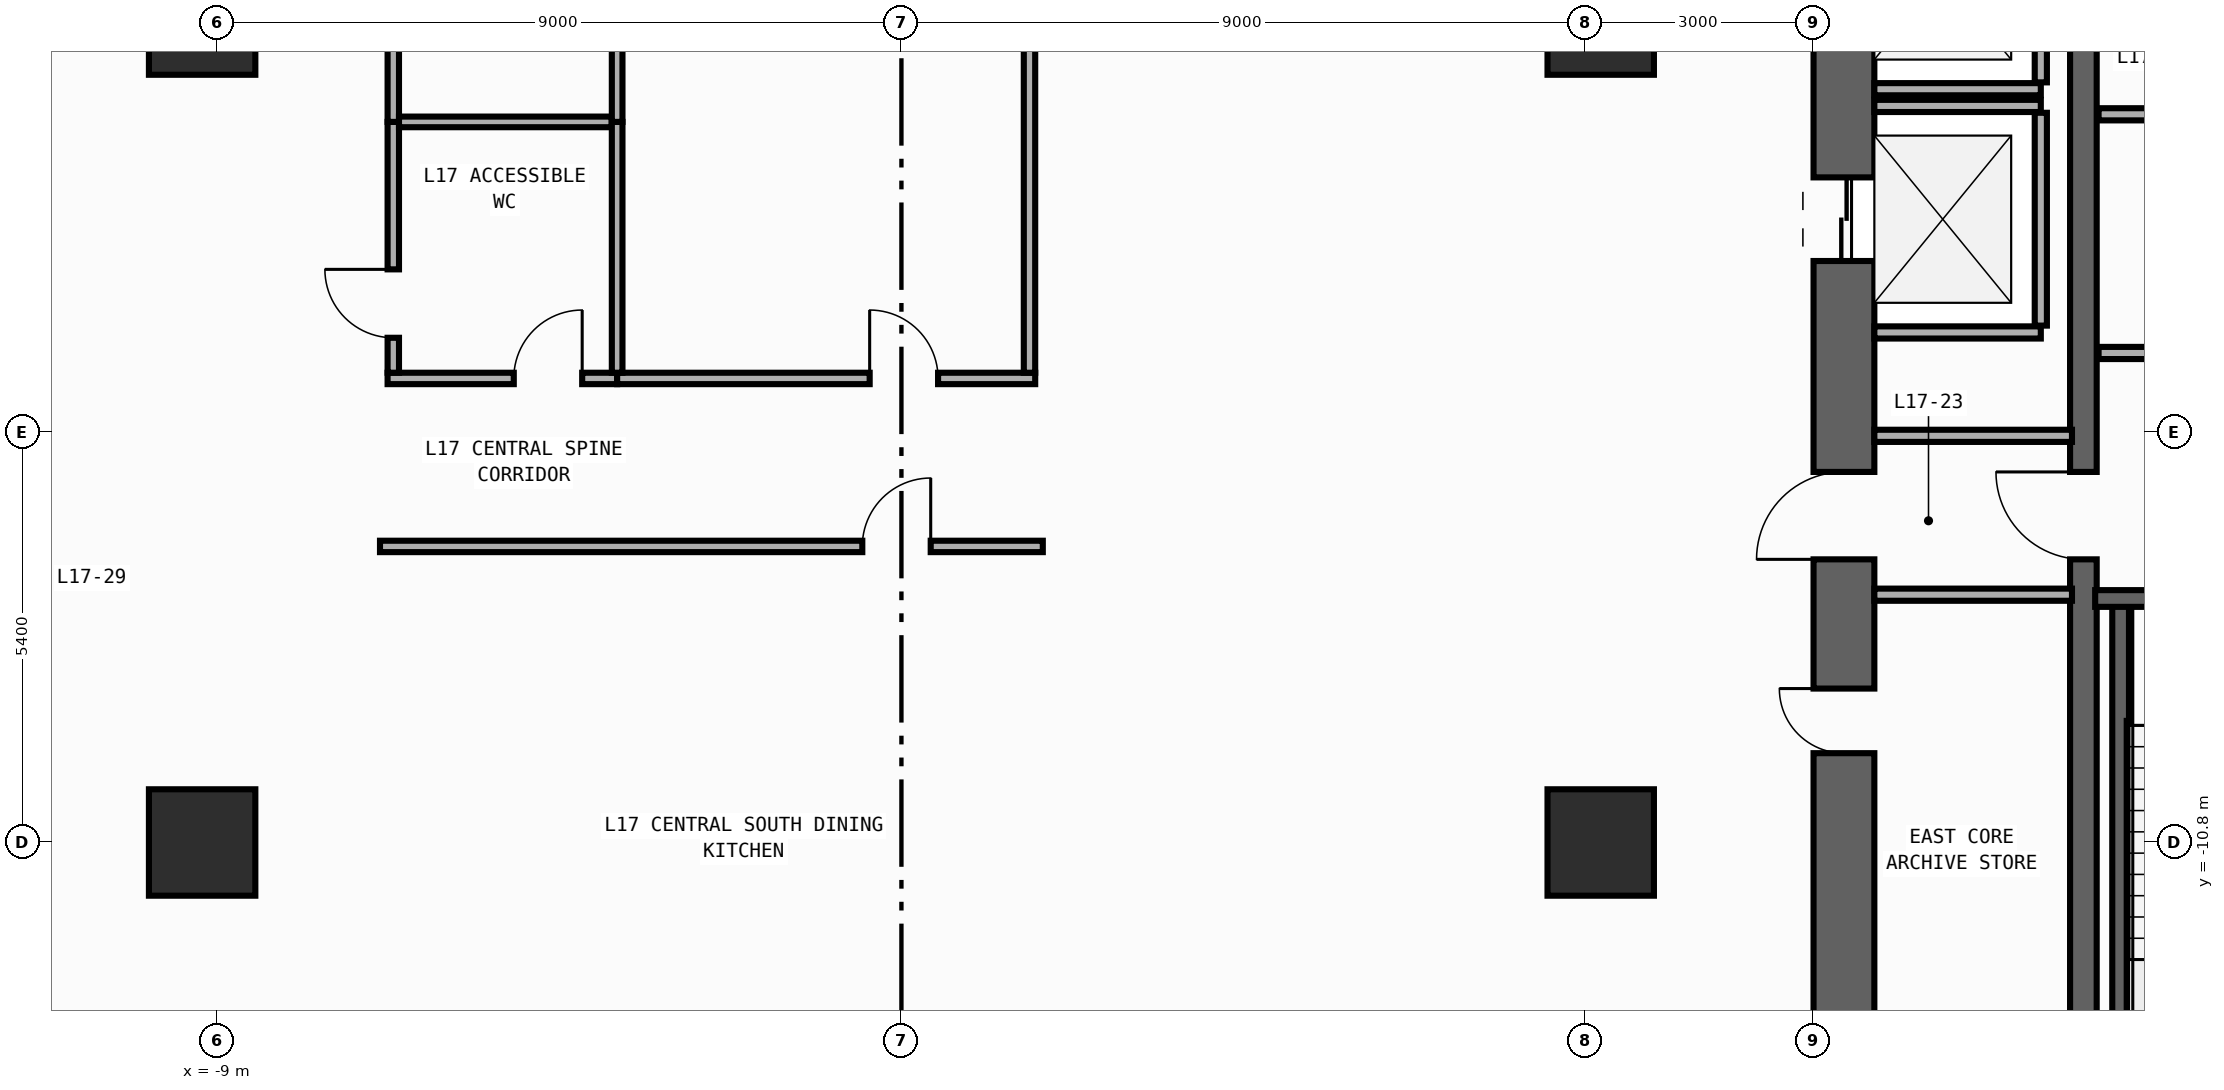
"""IFC4 building model, lengths in metres.
Left out: names, types, materials, properties, quantities, classifications, styles, units other than length and angle.
Written with IfcOpenShell. Run it as: python <this file> out.ifc"""

import sys

from ifc_helpers import new_model, si_unit, direction, frame, frame_2d, origin, origin_2d, place, context, subcontext, project, spatial, rectangle, extrude, element, fill, save


model = new_model("IFC4")
c1 = context("Model", 3, precision=1e-05, world=origin(), true_north=direction((0.0, 1.0)))
c2 = subcontext(c1, "Body", "Model", "MODEL_VIEW")
j1 = project(units=[si_unit("LENGTHUNIT", "METRE"), si_unit("PLANEANGLEUNIT", "RADIAN")], contexts=[c1])
p1 = place(None, origin())
s1 = spatial("IfcSite", under=j1, at=p1, CompositionType="ELEMENT")
p2 = place(p1, origin())
s2 = spatial("IfcBuilding", under=s1, at=p2, CompositionType="ELEMENT")
p3 = place(p2, frame((0.0, 0.0, 72.2)))
s3 = spatial("IfcBuildingStorey", under=s2, at=p3, CompositionType="ELEMENT", Elevation=72.2)
p4 = place(p3, frame((12.4, -19.8, 0.0), z_axis=(0.0, 0.0, 1.0), x_axis=(0.0, 1.0, 0.0)))
e1 = element("IfcWall", 1, at=p4, inside=s3, PredefinedType="SHEAR", context=c2, shape_type="SweptSolid", body=[
    extrude(rectangle(XDim=27.0, YDim=0.8, at=frame_2d((13.5, 0.0))), origin(), (0.0, 0.0, 1.0), 3.94),
])
p5 = place(p4, frame((23.05, 0.0, 0.0)))
e2 = element("IfcOpeningElement", 2, at=p5, cuts=e1, PredefinedType="OPENING", context=c2, shape_type="SweptSolid", body=[
    extrude(rectangle(XDim=1.1, YDim=2.2, at=frame_2d((0.55, 1.1))), frame((0.0, 0.41, 0.0), z_axis=(0.0, -1.0, 0.0), x_axis=(1.0, 0.0, 0.0)), (0.0, 0.0, 1.0), 0.82),
])
p6 = place(p4, frame((19.85, 0.0, 0.0)))
e3 = element("IfcOpeningElement", 3, at=p6, cuts=e1, PredefinedType="OPENING", context=c2, shape_type="SweptSolid", body=[
    extrude(rectangle(XDim=1.1, YDim=2.2, at=frame_2d((0.55, 1.1))), frame((0.0, 0.41, 0.0), z_axis=(0.0, -1.0, 0.0), x_axis=(1.0, 0.0, 0.0)), (0.0, 0.0, 1.0), 0.82),
])
p7 = place(p4, frame((16.65, 0.0, 0.0)))
e4 = element("IfcOpeningElement", 4, at=p7, cuts=e1, PredefinedType="OPENING", context=c2, shape_type="SweptSolid", body=[
    extrude(rectangle(XDim=1.1, YDim=2.2, at=frame_2d((0.55, 1.1))), frame((0.0, 0.41, 0.0), z_axis=(0.0, -1.0, 0.0), x_axis=(1.0, 0.0, 0.0)), (0.0, 0.0, 1.0), 0.82),
])
p8 = place(p4, frame((10.175, 0.0, 0.0)))
e5 = element("IfcOpeningElement", 5, at=p8, cuts=e1, PredefinedType="OPENING", context=c2, shape_type="SweptSolid", body=[
    extrude(rectangle(XDim=0.85, YDim=2.1, at=frame_2d((0.425, 1.05))), frame((0.0, 0.41, 0.0), z_axis=(0.0, -1.0, 0.0), x_axis=(1.0, 0.0, 0.0)), (0.0, 0.0, 1.0), 0.82),
])
p9 = place(p4, frame((12.725, 0.0, 0.0)))
e6 = element("IfcOpeningElement", 6, at=p9, cuts=e1, PredefinedType="OPENING", context=c2, shape_type="SweptSolid", body=[
    extrude(rectangle(XDim=1.15, YDim=2.2, at=frame_2d((0.575, 1.1))), frame((0.0, 0.41, 0.0), z_axis=(0.0, -1.0, 0.0), x_axis=(1.0, 0.0, 0.0)), (0.0, 0.0, 1.0), 0.82),
])
p10 = place(p4, frame((25.125, 0.0, 0.0)))
e7 = element("IfcOpeningElement", 7, at=p10, cuts=e1, PredefinedType="OPENING", context=c2, shape_type="SweptSolid", body=[
    extrude(rectangle(XDim=0.85, YDim=2.1, at=frame_2d((0.425, 1.05))), frame((0.0, 0.41, 0.0), z_axis=(0.0, -1.0, 0.0), x_axis=(1.0, 0.0, 0.0)), (0.0, 0.0, 1.0), 0.82),
])
p11 = place(p3, frame((15.55, -19.0, 0.0), z_axis=(0.0, 0.0, 1.0), x_axis=(0.0, 1.0, 0.0)))
e8 = element("IfcWall", 8, at=p11, inside=s3, PredefinedType="SHEAR", context=c2, shape_type="SweptSolid", body=[
    extrude(rectangle(XDim=25.4, YDim=0.35, at=frame_2d((12.7, 0.0))), origin(), (0.0, 0.0, 1.0), 3.94),
])
p12 = place(p11, frame((11.925, 0.0, 0.0)))
e9 = element("IfcOpeningElement", 9, at=p12, cuts=e8, PredefinedType="OPENING", context=c2, shape_type="SweptSolid", body=[
    extrude(rectangle(XDim=1.15, YDim=2.2, at=frame_2d((0.575, 1.1))), frame((0.0, 0.185, 0.0), z_axis=(0.0, -1.0, 0.0), x_axis=(1.0, 0.0, 0.0)), (0.0, 0.0, 1.0), 0.37),
])
p13 = place(p11, frame((24.325, 0.0, 0.0)))
e10 = element("IfcOpeningElement", 10, at=p13, cuts=e8, PredefinedType="OPENING", context=c2, shape_type="SweptSolid", body=[
    extrude(rectangle(XDim=0.85, YDim=2.1, at=frame_2d((0.425, 1.05))), frame((0.0, 0.185, 0.0), z_axis=(0.0, -1.0, 0.0), x_axis=(1.0, 0.0, 0.0)), (0.0, 0.0, 1.0), 0.37),
])
p14 = place(p3, frame((16.04, -18.89, 0.0), z_axis=(0.0, 0.0, 1.0), x_axis=(0.0, 1.0, 0.0)))
e11 = element("IfcWall", 11, at=p14, inside=s3, PredefinedType="SHEAR", context=c2, shape_type="SweptSolid", body=[
    extrude(rectangle(XDim=11.3, YDim=0.22, at=frame_2d((5.65, 0.0))), origin(), (0.0, 0.0, 1.0), 3.94),
])
p15 = place(p3, frame((19.62, -7.59, 0.0), z_axis=(0.0, 0.0, 1.0), x_axis=(-1.0, 0.0, 0.0)))
e12 = element("IfcWall", 12, at=p15, inside=s3, PredefinedType="SHEAR", context=c2, shape_type="SweptSolid", body=[
    extrude(rectangle(XDim=3.915, YDim=0.22, at=frame_2d((1.958, 0.0))), origin(), (0.0, 0.0, 1.0), 3.94),
])
p16 = place(p15, frame((1.08, 0.0, 0.0)))
e13 = element("IfcOpeningElement", 13, at=p16, cuts=e12, PredefinedType="OPENING", context=c2, shape_type="SweptSolid", body=[
    extrude(rectangle(XDim=1.1, YDim=2.2, at=frame_2d((0.55, 1.1))), frame((0.0, 0.12, 0.0), z_axis=(0.0, -1.0, 0.0), x_axis=(1.0, 0.0, 0.0)), (0.0, 0.0, 1.0), 0.24),
])
for number, where, z_axis, x_axis in (
    (14, (-9.2, -10.8, 0.0), (0.0, 0.0, 1.0), (1.0, 0.0, 0.0)),
    (15, (-9.2, 0.0, 0.0), (0.0, 0.0, 1.0), (1.0, 0.0, 0.0)),
    (16, (9.2, -10.8, 0.0), (0.0, 0.0, 1.0), (1.0, 0.0, 0.0)),
    (17, (9.2, 0.0, 0.0), (0.0, 0.0, 1.0), (1.0, 0.0, 0.0)),
):
    element("IfcColumn", number, at=place(p3, frame(where, z_axis=z_axis, x_axis=x_axis)), inside=s3, PredefinedType="COLUMN", context=c2, shape_type="SweptSolid", body=[
        extrude(rectangle(XDim=1.4, YDim=1.4, at=origin_2d()), origin(), (0.0, 0.0, 1.0), 4.2),
    ])
p17 = place(p3, frame((12.8, -0.89, 0.0), z_axis=(0.0, 0.0, 1.0), x_axis=(1.0, 0.0, 0.0)))
e18 = element("IfcWall", 18, at=p17, inside=s3, PredefinedType="STANDARD", context=c2, shape_type="SweptSolid", body=[
    extrude(rectangle(XDim=2.19, YDim=0.16, at=frame_2d((1.095, 0.0))), origin(), (0.0, 0.0, 1.0), 3.94),
])
p18 = place(p3, frame((14.99, -0.8, 0.0), z_axis=(0.0, 0.0, 1.0), x_axis=(0.0, 1.0, 0.0)))
e19 = element("IfcWall", 19, at=p18, inside=s3, PredefinedType="STANDARD", context=c2, shape_type="SweptSolid", body=[
    extrude(rectangle(XDim=2.8, YDim=0.16, at=frame_2d((1.4, 0.0))), origin(), (0.0, 0.0, 1.0), 3.94),
])
for number, where, z_axis, x_axis in (
    (20, (12.8, -4.09, 0.0), (0.0, 0.0, 1.0), (1.0, 0.0, 0.0)),
    (21, (12.8, -1.11, 0.0), (0.0, 0.0, 1.0), (1.0, 0.0, 0.0)),
):
    element("IfcWall", number, at=place(p3, frame(where, z_axis=z_axis, x_axis=x_axis)), inside=s3, PredefinedType="STANDARD", context=c2, shape_type="SweptSolid", body=[
        extrude(rectangle(XDim=2.19, YDim=0.16, at=frame_2d((1.095, 0.0))), origin(), (0.0, 0.0, 1.0), 3.94),
    ])
p19 = place(p3, frame((14.99, -4.0, 0.0), z_axis=(0.0, 0.0, 1.0), x_axis=(0.0, 1.0, 0.0)))
e22 = element("IfcWall", 22, at=p19, inside=s3, PredefinedType="STANDARD", context=c2, shape_type="SweptSolid", body=[
    extrude(rectangle(XDim=2.8, YDim=0.16, at=frame_2d((1.4, 0.0))), origin(), (0.0, 0.0, 1.0), 3.94),
])
p20 = place(p3, frame((15.75, -4.36, 0.0), z_axis=(0.0, 0.0, 1.0), x_axis=(1.0, 0.0, 0.0)))
e23 = element("IfcWall", 23, at=p20, inside=s3, PredefinedType="STANDARD", context=c2, shape_type="SweptSolid", body=[
    extrude(rectangle(XDim=3.8, YDim=0.16, at=frame_2d((1.9, 0.0))), origin(), (0.0, 0.0, 1.0), 3.94),
])
p21 = place(p20, frame((1.47, 0.0, 0.0)))
e24 = element("IfcOpeningElement", 24, at=p21, cuts=e23, PredefinedType="OPENING", context=c2, shape_type="SweptSolid", body=[
    extrude(rectangle(XDim=1.15, YDim=2.2, at=frame_2d((0.575, 1.1))), frame((0.0, 0.09, 0.0), z_axis=(0.0, -1.0, 0.0), x_axis=(1.0, 0.0, 0.0)), (0.0, 0.0, 1.0), 0.18),
])
p22 = place(p3, frame((15.75, -1.22, 0.0), z_axis=(0.0, 0.0, 1.0), x_axis=(1.0, 0.0, 0.0)))
e25 = element("IfcWall", 25, at=p22, inside=s3, PredefinedType="STANDARD", context=c2, shape_type="SweptSolid", body=[
    extrude(rectangle(XDim=3.8, YDim=0.16, at=frame_2d((1.9, 0.0))), origin(), (0.0, 0.0, 1.0), 3.94),
])
for number, where, z_axis, x_axis in (
    (26, (12.8, -5.45, 0.0), (0.0, 0.0, 1.0), (1.0, 0.0, 0.0)),
    (27, (12.8, -7.54, 0.0), (0.0, 0.0, 1.0), (1.0, 0.0, 0.0)),
):
    element("IfcWall", number, at=place(p3, frame(where, z_axis=z_axis, x_axis=x_axis)), inside=s3, PredefinedType="STANDARD", context=c2, shape_type="SweptSolid", body=[
        extrude(rectangle(XDim=2.6, YDim=0.16, at=frame_2d((1.3, 0.0))), origin(), (0.0, 0.0, 1.0), 3.94),
    ])
p23 = place(p3, frame((-6.76, -4.695, 0.0), z_axis=(0.0, 0.0, 1.0), x_axis=(1.0, 0.0, 0.0)))
e28 = element("IfcWall", 28, at=p23, inside=s3, PredefinedType="PARTITIONING", context=c2, shape_type="SweptSolid", body=[
    extrude(rectangle(XDim=3.02, YDim=0.15, at=frame_2d((1.51, 0.0))), origin(), (0.0, 0.0, 1.0), 3.94),
])
p24 = place(p23, frame((1.66, 0.0, 0.0)))
e29 = element("IfcOpeningElement", 29, at=p24, cuts=e28, PredefinedType="OPENING", context=c2, shape_type="SweptSolid", body=[
    extrude(rectangle(XDim=0.9, YDim=2.15, at=frame_2d((0.45, 1.075))), frame((0.0, 0.085, 0.0), z_axis=(0.0, -1.0, 0.0), x_axis=(1.0, 0.0, 0.0)), (0.0, 0.0, 1.0), 0.17),
])
p25 = place(p3, frame((-3.74, -4.695, 0.0), z_axis=(0.0, 0.0, 1.0), x_axis=(1.0, 0.0, 0.0)))
e30 = element("IfcWall", 30, at=p25, inside=s3, PredefinedType="PARTITIONING", context=c2, shape_type="SweptSolid", body=[
    extrude(rectangle(XDim=5.5, YDim=0.15, at=frame_2d((2.75, 0.0))), origin(), (0.0, 0.0, 1.0), 3.94),
])
p26 = place(p25, frame((3.322, 0.0, 0.0)))
e31 = element("IfcOpeningElement", 31, at=p26, cuts=e30, PredefinedType="OPENING", context=c2, shape_type="SweptSolid", body=[
    extrude(rectangle(XDim=0.9, YDim=2.15, at=frame_2d((0.45, 1.075))), frame((0.0, 0.085, 0.0), z_axis=(0.0, -1.0, 0.0), x_axis=(1.0, 0.0, 0.0)), (0.0, 0.0, 1.0), 0.17),
])
p27 = place(p3, frame((-6.86, -6.905, 0.0), z_axis=(0.0, 0.0, 1.0), x_axis=(1.0, 0.0, 0.0)))
e32 = element("IfcWall", 32, at=p27, inside=s3, PredefinedType="PARTITIONING", context=c2, shape_type="SweptSolid", body=[
    extrude(rectangle(XDim=8.72, YDim=0.15, at=frame_2d((4.36, 0.0))), origin(), (0.0, 0.0, 1.0), 3.94),
])
p28 = place(p27, frame((6.345, 0.0, 0.0)))
e33 = element("IfcOpeningElement", 33, at=p28, cuts=e32, PredefinedType="OPENING", context=c2, shape_type="SweptSolid", body=[
    extrude(rectangle(XDim=0.9, YDim=2.15, at=frame_2d((0.45, 1.075))), frame((0.0, 0.085, 0.0), z_axis=(0.0, -1.0, 0.0), x_axis=(1.0, 0.0, 0.0)), (0.0, 0.0, 1.0), 0.17),
])
p29 = place(p3, frame((-6.685, -4.62, 0.0), z_axis=(0.0, 0.0, 1.0), x_axis=(0.0, 1.0, 0.0)))
e34 = element("IfcWall", 34, at=p29, inside=s3, PredefinedType="PARTITIONING", context=c2, shape_type="SweptSolid", body=[
    extrude(rectangle(XDim=3.3, YDim=0.15, at=frame_2d((1.65, 0.0))), origin(), (0.0, 0.0, 1.0), 3.94),
])
p30 = place(p29, frame((0.46, 0.0, 0.0)))
e35 = element("IfcOpeningElement", 35, at=p30, cuts=e34, PredefinedType="OPENING", context=c2, shape_type="SweptSolid", body=[
    extrude(rectangle(XDim=0.9, YDim=2.15, at=frame_2d((0.45, 1.075))), frame((0.0, 0.085, 0.0), z_axis=(0.0, -1.0, 0.0), x_axis=(1.0, 0.0, 0.0)), (0.0, 0.0, 1.0), 0.17),
])
p31 = place(p3, frame((-6.685, -1.32, 0.0), z_axis=(0.0, 0.0, 1.0), x_axis=(0.0, 1.0, 0.0)))
e36 = element("IfcWall", 36, at=p31, inside=s3, PredefinedType="PARTITIONING", context=c2, shape_type="SweptSolid", body=[
    extrude(rectangle(XDim=6.96, YDim=0.15, at=frame_2d((3.48, 0.0))), origin(), (0.0, 0.0, 1.0), 3.94),
])
p32 = place(p31, frame((5.6, 0.0, 0.0)))
e37 = element("IfcOpeningElement", 37, at=p32, cuts=e36, PredefinedType="OPENING", context=c2, shape_type="SweptSolid", body=[
    extrude(rectangle(XDim=0.9, YDim=2.15, at=frame_2d((0.45, 1.075))), frame((0.0, 0.085, 0.0), z_axis=(0.0, -1.0, 0.0), x_axis=(1.0, 0.0, 0.0)), (0.0, 0.0, 1.0), 0.17),
])
p33 = place(p3, frame((1.685, -4.62, 0.0), z_axis=(0.0, 0.0, 1.0), x_axis=(0.0, 1.0, 0.0)))
e38 = element("IfcWall", 38, at=p33, inside=s3, PredefinedType="PARTITIONING", context=c2, shape_type="SweptSolid", body=[
    extrude(rectangle(XDim=20.005, YDim=0.15, at=frame_2d((10.002, 0.0))), origin(), (0.0, 0.0, 1.0), 3.94),
])
p34 = place(p33, frame((9.552, 0.0, 0.0)))
e39 = element("IfcOpeningElement", 39, at=p34, cuts=e38, PredefinedType="OPENING", context=c2, shape_type="SweptSolid", body=[
    extrude(rectangle(XDim=0.9, YDim=2.15, at=frame_2d((0.45, 1.075))), frame((0.0, 0.085, 0.0), z_axis=(0.0, -1.0, 0.0), x_axis=(1.0, 0.0, 0.0)), (0.0, 0.0, 1.0), 0.17),
])
p35 = place(p3, frame((-6.61, -1.32, 0.0), z_axis=(0.0, 0.0, 1.0), x_axis=(1.0, 0.0, 0.0)))
e40 = element("IfcWall", 40, at=p35, inside=s3, PredefinedType="PARTITIONING", context=c2, shape_type="SweptSolid", body=[
    extrude(rectangle(XDim=2.8, YDim=0.14, at=frame_2d((1.4, 0.0))), origin(), (0.0, 0.0, 1.0), 3.94),
])
p36 = place(p3, frame((-3.74, -4.62, 0.0), z_axis=(0.0, 0.0, 1.0), x_axis=(0.0, 1.0, 0.0)))
e41 = element("IfcWall", 41, at=p36, inside=s3, PredefinedType="PARTITIONING", context=c2, shape_type="SweptSolid", body=[
    extrude(rectangle(XDim=3.3, YDim=0.14, at=frame_2d((1.65, 0.0))), origin(), (0.0, 0.0, 1.0), 3.94),
])
p37 = place(p3, frame((-3.74, -1.32, 0.0), z_axis=(0.0, 0.0, 1.0), x_axis=(0.0, 1.0, 0.0)))
e42 = element("IfcWall", 42, at=p37, inside=s3, PredefinedType="PARTITIONING", context=c2, shape_type="SweptSolid", body=[
    extrude(rectangle(XDim=6.96, YDim=0.14, at=frame_2d((3.48, 0.0))), origin(), (0.0, 0.0, 1.0), 3.94),
])
p38 = place(p7, origin())
e43 = element("IfcDoor", 43, at=p38, inside=s3, OperationType="DOUBLE_DOOR_SLIDING", PredefinedType="DOOR", context=c2, shape_type="SweptSolid", body=[
    extrude(rectangle(XDim=1.1, YDim=2.2, at=frame_2d((0.55, 1.1))), frame((0.0, 0.025, 0.0), z_axis=(0.0, -1.0, 0.0), x_axis=(1.0, 0.0, 0.0)), (0.0, 0.0, 1.0), 0.05),
])
fill(e4, e43)
p39 = place(p8, origin())
e44 = element("IfcDoor", 44, at=p39, inside=s3, OperationType="SINGLE_SWING_RIGHT", PredefinedType="DOOR", context=c2, shape_type="SweptSolid", body=[
    extrude(rectangle(XDim=0.85, YDim=2.1, at=frame_2d((0.425, 1.05))), frame((0.0, 0.025, 0.0), z_axis=(0.0, -1.0, 0.0), x_axis=(1.0, 0.0, 0.0)), (0.0, 0.0, 1.0), 0.05),
])
fill(e5, e44)
p40 = place(p9, origin())
e45 = element("IfcDoor", 45, at=p40, inside=s3, OperationType="SINGLE_SWING_LEFT", PredefinedType="DOOR", context=c2, shape_type="SweptSolid", body=[
    extrude(rectangle(XDim=1.15, YDim=2.2, at=frame_2d((0.575, 1.1))), frame((0.0, 0.025, 0.0), z_axis=(0.0, -1.0, 0.0), x_axis=(1.0, 0.0, 0.0)), (0.0, 0.0, 1.0), 0.05),
])
fill(e6, e45)
p41 = place(p12, origin())
e46 = element("IfcDoor", 46, at=p41, inside=s3, OperationType="SINGLE_SWING_RIGHT", PredefinedType="DOOR", context=c2, shape_type="SweptSolid", body=[
    extrude(rectangle(XDim=1.15, YDim=2.2, at=frame_2d((0.575, 1.1))), frame((0.0, 0.025, 0.0), z_axis=(0.0, -1.0, 0.0), x_axis=(1.0, 0.0, 0.0)), (0.0, 0.0, 1.0), 0.05),
])
fill(e9, e46)
p42 = place(p24, origin())
e47 = element("IfcDoor", 47, at=p42, inside=s3, OperationType="SINGLE_SWING_RIGHT", PredefinedType="DOOR", context=c2, shape_type="SweptSolid", body=[
    extrude(rectangle(XDim=0.9, YDim=2.15, at=frame_2d((0.45, 1.075))), frame((0.0, 0.025, 0.0), z_axis=(0.0, -1.0, 0.0), x_axis=(1.0, 0.0, 0.0)), (0.0, 0.0, 1.0), 0.05),
])
fill(e29, e47)
p43 = place(p26, origin())
e48 = element("IfcDoor", 48, at=p43, inside=s3, OperationType="SINGLE_SWING_LEFT", PredefinedType="DOOR", context=c2, shape_type="SweptSolid", body=[
    extrude(rectangle(XDim=0.9, YDim=2.15, at=frame_2d((0.45, 1.075))), frame((0.0, 0.025, 0.0), z_axis=(0.0, -1.0, 0.0), x_axis=(1.0, 0.0, 0.0)), (0.0, 0.0, 1.0), 0.05),
])
fill(e31, e48)
p44 = place(p28, origin())
e49 = element("IfcDoor", 49, at=p44, inside=s3, OperationType="SINGLE_SWING_RIGHT", PredefinedType="DOOR", context=c2, shape_type="SweptSolid", body=[
    extrude(rectangle(XDim=0.9, YDim=2.15, at=frame_2d((0.45, 1.075))), frame((0.0, 0.025, 0.0), z_axis=(0.0, -1.0, 0.0), x_axis=(1.0, 0.0, 0.0)), (0.0, 0.0, 1.0), 0.05),
])
fill(e33, e49)
p45 = place(p30, origin())
e50 = element("IfcDoor", 50, at=p45, inside=s3, OperationType="SINGLE_SWING_RIGHT", PredefinedType="DOOR", context=c2, shape_type="SweptSolid", body=[
    extrude(rectangle(XDim=0.9, YDim=2.15, at=frame_2d((0.45, 1.075))), frame((0.0, 0.025, 0.0), z_axis=(0.0, -1.0, 0.0), x_axis=(1.0, 0.0, 0.0)), (0.0, 0.0, 1.0), 0.05),
])
fill(e35, e50)
save(model, sys.argv[1])
